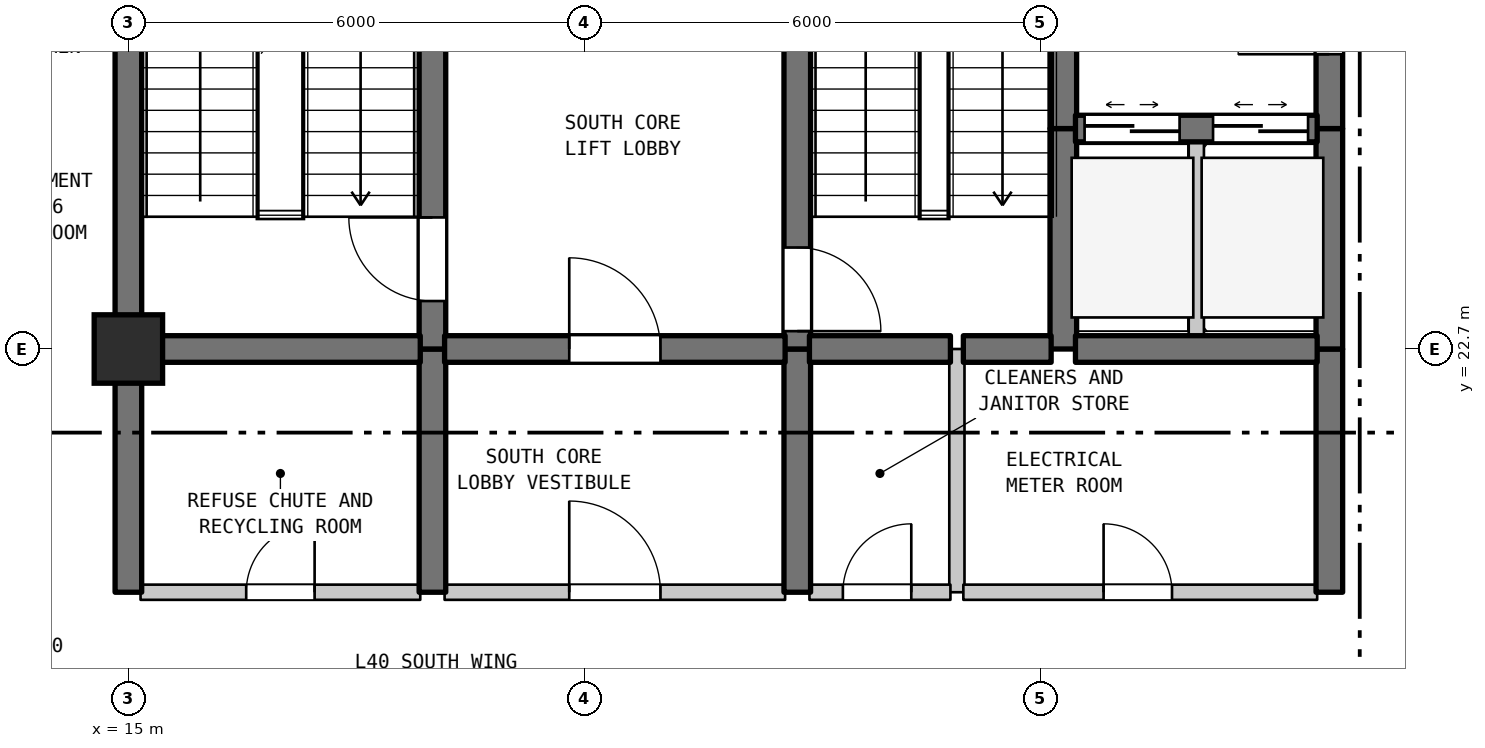
"""IFC4 building model, lengths in metres.
Left out: names, types, materials, properties, quantities, classifications, styles, units other than length and angle.
Written with IfcOpenShell. Run it as: python <this file> out.ifc"""

import sys

from ifc_helpers import new_model, si_unit, direction, frame, frame_2d, origin, origin_2d, place, context, subcontext, project, spatial, rectangle, extrude, element, fill, save


model = new_model("IFC4")
c1 = context("Model", 3, precision=1e-05, world=origin(), true_north=direction((0.0, 1.0)))
c2 = subcontext(c1, "Body", "Model", "MODEL_VIEW")
j1 = project(units=[si_unit("LENGTHUNIT", "METRE"), si_unit("PLANEANGLEUNIT", "RADIAN")], contexts=[c1])
p1 = place(None, origin())
s1 = spatial("IfcSite", under=j1, at=p1, CompositionType="ELEMENT")
p2 = place(p1, origin())
s2 = spatial("IfcBuilding", under=s1, at=p2, CompositionType="ELEMENT")
p3 = place(p2, frame((0.0, 0.0, 164.6)))
s3 = spatial("IfcBuildingStorey", under=s2, at=p3, CompositionType="ELEMENT", Elevation=164.6)
p4 = place(p3, frame((15.0, 22.7, 0.0), z_axis=(0.0, 0.0, 1.0), x_axis=(1.0, 0.0, 0.0)))
e1 = element("IfcColumn", 1, at=p4, inside=s3, PredefinedType="COLUMN", context=c2, shape_type="SweptSolid", body=[
    extrude(rectangle(XDim=0.9, YDim=0.9, at=origin_2d()), origin(), (0.0, 0.0, 1.0), 4.5),
])
p5 = place(p3, frame((15.0, 19.5, 0.0), z_axis=(0.0, 0.0, 1.0), x_axis=(0.0, 1.0, 0.0)))
e2 = element("IfcWall", 2, at=p5, inside=s3, PredefinedType="SHEAR", context=c2, shape_type="SweptSolid", body=[
    extrude(rectangle(XDim=3.2, YDim=0.35, at=frame_2d((1.6, 0.0))), origin(), (0.0, 0.0, 1.0), 4.19),
])
p6 = place(p3, frame((15.0, 22.7, 0.0), z_axis=(0.0, 0.0, 1.0), x_axis=(0.0, 1.0, 0.0)))
e3 = element("IfcWall", 3, at=p6, inside=s3, PredefinedType="SHEAR", context=c2, shape_type="SweptSolid", body=[
    extrude(rectangle(XDim=6.8, YDim=0.35, at=frame_2d((3.4, 0.0))), origin(), (0.0, 0.0, 1.0), 4.19),
])
p7 = place(p3, frame((19.0, 19.5, 0.0), z_axis=(0.0, 0.0, 1.0), x_axis=(0.0, 1.0, 0.0)))
e4 = element("IfcWall", 4, at=p7, inside=s3, PredefinedType="SHEAR", context=c2, shape_type="SweptSolid", body=[
    extrude(rectangle(XDim=3.2, YDim=0.35, at=frame_2d((1.6, 0.0))), origin(), (0.0, 0.0, 1.0), 4.19),
])
p8 = place(p3, frame((19.0, 22.7, 0.0), z_axis=(0.0, 0.0, 1.0), x_axis=(0.0, 1.0, 0.0)))
e5 = element("IfcWall", 5, at=p8, inside=s3, PredefinedType="SHEAR", context=c2, shape_type="SweptSolid", body=[
    extrude(rectangle(XDim=5.5, YDim=0.35, at=frame_2d((2.75, 0.0))), origin(), (0.0, 0.0, 1.0), 4.19),
])
p9 = place(p8, frame((0.631, 0.0, 0.0)))
e6 = element("IfcOpeningElement", 6, at=p9, cuts=e5, PredefinedType="OPENING", context=c2, shape_type="SweptSolid", body=[
    extrude(rectangle(XDim=1.1, YDim=2.15, at=frame_2d((0.55, 1.075))), frame((0.0, 0.185, 0.0), z_axis=(0.0, -1.0, 0.0), x_axis=(1.0, 0.0, 0.0)), (0.0, 0.0, 1.0), 0.37),
])
p10 = place(p3, frame((23.8, 19.5, 0.0), z_axis=(0.0, 0.0, 1.0), x_axis=(0.0, 1.0, 0.0)))
e7 = element("IfcWall", 7, at=p10, inside=s3, PredefinedType="SHEAR", context=c2, shape_type="SweptSolid", body=[
    extrude(rectangle(XDim=3.2, YDim=0.35, at=frame_2d((1.6, 0.0))), origin(), (0.0, 0.0, 1.0), 4.19),
])
p11 = place(p3, frame((23.8, 22.7, 0.0), z_axis=(0.0, 0.0, 1.0), x_axis=(0.0, 1.0, 0.0)))
e8 = element("IfcWall", 8, at=p11, inside=s3, PredefinedType="SHEAR", context=c2, shape_type="SweptSolid", body=[
    extrude(rectangle(XDim=5.5, YDim=0.35, at=frame_2d((2.75, 0.0))), origin(), (0.0, 0.0, 1.0), 4.19),
])
p12 = place(p11, frame((0.235, 0.0, 0.0)))
e9 = element("IfcOpeningElement", 9, at=p12, cuts=e8, PredefinedType="OPENING", context=c2, shape_type="SweptSolid", body=[
    extrude(rectangle(XDim=1.1, YDim=2.15, at=frame_2d((0.55, 1.075))), frame((0.0, 0.185, 0.0), z_axis=(0.0, -1.0, 0.0), x_axis=(1.0, 0.0, 0.0)), (0.0, 0.0, 1.0), 0.37),
])
p13 = place(p3, frame((25.9, 19.5, 0.0), z_axis=(0.0, 0.0, 1.0), x_axis=(0.0, 1.0, 0.0)))
e10 = element("IfcWall", 10, at=p13, inside=s3, PredefinedType="STANDARD", context=c2, shape_type="SweptSolid", body=[
    extrude(rectangle(XDim=3.2, YDim=0.2, at=frame_2d((1.6, 0.0))), origin(), (0.0, 0.0, 1.0), 4.19),
])
p14 = place(p3, frame((27.3, 22.7, 0.0), z_axis=(0.0, 0.0, 1.0), x_axis=(0.0, 1.0, 0.0)))
e11 = element("IfcWall", 11, at=p14, inside=s3, PredefinedType="SHEAR", context=c2, shape_type="SweptSolid", body=[
    extrude(rectangle(XDim=2.9, YDim=0.35, at=frame_2d((1.45, 0.0))), origin(), (0.0, 0.0, 1.0), 4.19),
])
p15 = place(p3, frame((27.3, 25.6, 0.0), z_axis=(0.0, 0.0, 1.0), x_axis=(0.0, 1.0, 0.0)))
e12 = element("IfcWall", 12, at=p15, inside=s3, PredefinedType="SHEAR", context=c2, shape_type="SweptSolid", body=[
    extrude(rectangle(XDim=3.3, YDim=0.35, at=frame_2d((1.65, 0.0))), origin(), (0.0, 0.0, 1.0), 4.19),
])
p16 = place(p3, frame((29.05, 22.7, 0.0), z_axis=(0.0, 0.0, 1.0), x_axis=(0.0, 1.0, 0.0)))
e13 = element("IfcWall", 13, at=p16, inside=s3, PredefinedType="STANDARD", context=c2, shape_type="SweptSolid", body=[
    extrude(rectangle(XDim=2.9, YDim=0.2, at=frame_2d((1.45, 0.0))), origin(), (0.0, 0.0, 1.0), 4.19),
])
p17 = place(p3, frame((30.8, 19.5, 0.0), z_axis=(0.0, 0.0, 1.0), x_axis=(0.0, 1.0, 0.0)))
e14 = element("IfcWall", 14, at=p17, inside=s3, PredefinedType="SHEAR", context=c2, shape_type="SweptSolid", body=[
    extrude(rectangle(XDim=3.2, YDim=0.35, at=frame_2d((1.6, 0.0))), origin(), (0.0, 0.0, 1.0), 4.19),
])
p18 = place(p3, frame((30.8, 22.7, 0.0), z_axis=(0.0, 0.0, 1.0), x_axis=(0.0, 1.0, 0.0)))
e15 = element("IfcWall", 15, at=p18, inside=s3, PredefinedType="SHEAR", context=c2, shape_type="SweptSolid", body=[
    extrude(rectangle(XDim=2.9, YDim=0.35, at=frame_2d((1.45, 0.0))), origin(), (0.0, 0.0, 1.0), 4.19),
])
p19 = place(p3, frame((30.8, 25.6, 0.0), z_axis=(0.0, 0.0, 1.0), x_axis=(0.0, 1.0, 0.0)))
e16 = element("IfcWall", 16, at=p19, inside=s3, PredefinedType="SHEAR", context=c2, shape_type="SweptSolid", body=[
    extrude(rectangle(XDim=3.3, YDim=0.35, at=frame_2d((1.65, 0.0))), origin(), (0.0, 0.0, 1.0), 4.19),
])
p20 = place(p19, frame((0.978, 0.0, 0.0)))
e17 = element("IfcOpeningElement", 17, at=p20, cuts=e16, PredefinedType="OPENING", context=c2, shape_type="SweptSolid", body=[
    extrude(rectangle(XDim=1.2, YDim=2.2, at=frame_2d((0.6, 1.1))), frame((0.0, 0.185, 0.0), z_axis=(0.0, -1.0, 0.0), x_axis=(1.0, 0.0, 0.0)), (0.0, 0.0, 1.0), 0.37),
])
p21 = place(p3, frame((15.16, 19.5, 0.0), z_axis=(0.0, 0.0, 1.0), x_axis=(1.0, 0.0, 0.0)))
e18 = element("IfcWall", 18, at=p21, inside=s3, PredefinedType="STANDARD", context=c2, shape_type="SweptSolid", body=[
    extrude(rectangle(XDim=3.68, YDim=0.2, at=frame_2d((1.84, 0.0))), origin(), (0.0, 0.0, 1.0), 4.19),
])
p22 = place(p21, frame((1.39, 0.0, 0.0)))
e19 = element("IfcOpeningElement", 19, at=p22, cuts=e18, PredefinedType="OPENING", context=c2, shape_type="SweptSolid", body=[
    extrude(rectangle(XDim=0.9, YDim=2.15, at=frame_2d((0.45, 1.075))), frame((0.0, 0.11, 0.0), z_axis=(0.0, -1.0, 0.0), x_axis=(1.0, 0.0, 0.0)), (0.0, 0.0, 1.0), 0.22),
])
p23 = place(p3, frame((19.16, 19.5, 0.0), z_axis=(0.0, 0.0, 1.0), x_axis=(1.0, 0.0, 0.0)))
e20 = element("IfcWall", 20, at=p23, inside=s3, PredefinedType="STANDARD", context=c2, shape_type="SweptSolid", body=[
    extrude(rectangle(XDim=4.48, YDim=0.2, at=frame_2d((2.24, 0.0))), origin(), (0.0, 0.0, 1.0), 4.19),
])
p24 = place(p23, frame((1.64, 0.0, 0.0)))
e21 = element("IfcOpeningElement", 21, at=p24, cuts=e20, PredefinedType="OPENING", context=c2, shape_type="SweptSolid", body=[
    extrude(rectangle(XDim=1.2, YDim=2.2, at=frame_2d((0.6, 1.1))), frame((0.0, 0.11, 0.0), z_axis=(0.0, -1.0, 0.0), x_axis=(1.0, 0.0, 0.0)), (0.0, 0.0, 1.0), 0.22),
])
p25 = place(p3, frame((23.96, 19.5, 0.0), z_axis=(0.0, 0.0, 1.0), x_axis=(1.0, 0.0, 0.0)))
e22 = element("IfcWall", 22, at=p25, inside=s3, PredefinedType="STANDARD", context=c2, shape_type="SweptSolid", body=[
    extrude(rectangle(XDim=1.855, YDim=0.2, at=frame_2d((0.927, 0.0))), origin(), (0.0, 0.0, 1.0), 4.19),
])
p26 = place(p25, frame((0.44, 0.0, 0.0)))
e23 = element("IfcOpeningElement", 23, at=p26, cuts=e22, PredefinedType="OPENING", context=c2, shape_type="SweptSolid", body=[
    extrude(rectangle(XDim=0.9, YDim=2.15, at=frame_2d((0.45, 1.075))), frame((0.0, 0.11, 0.0), z_axis=(0.0, -1.0, 0.0), x_axis=(1.0, 0.0, 0.0)), (0.0, 0.0, 1.0), 0.22),
])
p27 = place(p3, frame((25.985, 19.5, 0.0), z_axis=(0.0, 0.0, 1.0), x_axis=(1.0, 0.0, 0.0)))
e24 = element("IfcWall", 24, at=p27, inside=s3, PredefinedType="STANDARD", context=c2, shape_type="SweptSolid", body=[
    extrude(rectangle(XDim=4.655, YDim=0.2, at=frame_2d((2.327, 0.0))), origin(), (0.0, 0.0, 1.0), 4.19),
])
p28 = place(p27, frame((1.845, 0.0, 0.0)))
e25 = element("IfcOpeningElement", 25, at=p28, cuts=e24, PredefinedType="OPENING", context=c2, shape_type="SweptSolid", body=[
    extrude(rectangle(XDim=0.9, YDim=2.15, at=frame_2d((0.45, 1.075))), frame((0.0, 0.11, 0.0), z_axis=(0.0, -1.0, 0.0), x_axis=(1.0, 0.0, 0.0)), (0.0, 0.0, 1.0), 0.22),
])
p29 = place(p3, frame((15.16, 22.7, 0.0), z_axis=(0.0, 0.0, 1.0), x_axis=(1.0, 0.0, 0.0)))
e26 = element("IfcWall", 26, at=p29, inside=s3, PredefinedType="SHEAR", context=c2, shape_type="SweptSolid", body=[
    extrude(rectangle(XDim=3.68, YDim=0.35, at=frame_2d((1.84, 0.0))), origin(), (0.0, 0.0, 1.0), 4.19),
])
p30 = place(p3, frame((19.16, 22.7, 0.0), z_axis=(0.0, 0.0, 1.0), x_axis=(1.0, 0.0, 0.0)))
e27 = element("IfcWall", 27, at=p30, inside=s3, PredefinedType="SHEAR", context=c2, shape_type="SweptSolid", body=[
    extrude(rectangle(XDim=4.48, YDim=0.35, at=frame_2d((2.24, 0.0))), origin(), (0.0, 0.0, 1.0), 4.19),
])
p31 = place(p30, frame((1.64, 0.0, 0.0)))
e28 = element("IfcOpeningElement", 28, at=p31, cuts=e27, PredefinedType="OPENING", context=c2, shape_type="SweptSolid", body=[
    extrude(rectangle(XDim=1.2, YDim=2.2, at=frame_2d((0.6, 1.1))), frame((0.0, 0.185, 0.0), z_axis=(0.0, -1.0, 0.0), x_axis=(1.0, 0.0, 0.0)), (0.0, 0.0, 1.0), 0.37),
])
p32 = place(p3, frame((23.96, 22.7, 0.0), z_axis=(0.0, 0.0, 1.0), x_axis=(1.0, 0.0, 0.0)))
e29 = element("IfcWall", 29, at=p32, inside=s3, PredefinedType="SHEAR", context=c2, shape_type="SweptSolid", body=[
    extrude(rectangle(XDim=1.855, YDim=0.35, at=frame_2d((0.927, 0.0))), origin(), (0.0, 0.0, 1.0), 4.19),
])
p33 = place(p3, frame((25.985, 22.7, 0.0), z_axis=(0.0, 0.0, 1.0), x_axis=(1.0, 0.0, 0.0)))
e30 = element("IfcWall", 30, at=p33, inside=s3, PredefinedType="SHEAR", context=c2, shape_type="SweptSolid", body=[
    extrude(rectangle(XDim=1.155, YDim=0.35, at=frame_2d((0.577, 0.0))), origin(), (0.0, 0.0, 1.0), 4.19),
])
p34 = place(p3, frame((27.46, 22.7, 0.0), z_axis=(0.0, 0.0, 1.0), x_axis=(1.0, 0.0, 0.0)))
e31 = element("IfcWall", 31, at=p34, inside=s3, PredefinedType="SHEAR", context=c2, shape_type="SweptSolid", body=[
    extrude(rectangle(XDim=3.18, YDim=0.35, at=frame_2d((1.59, 0.0))), origin(), (0.0, 0.0, 1.0), 4.19),
])
p35 = place(p3, frame((27.46, 25.6, 0.0), z_axis=(0.0, 0.0, 1.0), x_axis=(1.0, 0.0, 0.0)))
e32 = element("IfcWall", 32, at=p35, inside=s3, PredefinedType="SHEAR", context=c2, shape_type="SweptSolid", body=[
    extrude(rectangle(XDim=3.18, YDim=0.35, at=frame_2d((1.59, 0.0))), origin(), (0.0, 0.0, 1.0), 4.19),
])
p36 = place(p35, frame((0.12, 0.0, 0.0)))
e33 = element("IfcOpeningElement", 33, at=p36, cuts=e32, PredefinedType="OPENING", context=c2, shape_type="SweptSolid", body=[
    extrude(rectangle(XDim=1.25, YDim=2.2, at=frame_2d((0.625, 1.1))), frame((0.0, 0.185, 0.0), z_axis=(0.0, -1.0, 0.0), x_axis=(1.0, 0.0, 0.0)), (0.0, 0.0, 1.0), 0.37),
])
p37 = place(p35, frame((1.81, 0.0, 0.0)))
e34 = element("IfcOpeningElement", 34, at=p37, cuts=e32, PredefinedType="OPENING", context=c2, shape_type="SweptSolid", body=[
    extrude(rectangle(XDim=1.25, YDim=2.2, at=frame_2d((0.625, 1.1))), frame((0.0, 0.185, 0.0), z_axis=(0.0, -1.0, 0.0), x_axis=(1.0, 0.0, 0.0)), (0.0, 0.0, 1.0), 0.37),
])
p38 = place(p9, origin())
e35 = element("IfcDoor", 35, at=p38, inside=s3, OperationType="SINGLE_SWING_RIGHT", PredefinedType="DOOR", context=c2, shape_type="SweptSolid", body=[
    extrude(rectangle(XDim=1.1, YDim=2.15, at=frame_2d((0.55, 1.075))), frame((0.0, 0.025, 0.0), z_axis=(0.0, -1.0, 0.0), x_axis=(1.0, 0.0, 0.0)), (0.0, 0.0, 1.0), 0.05),
])
fill(e6, e35)
p39 = place(p12, frame((1.1, 0.0, 0.0), z_axis=(0.0, 0.0, 1.0), x_axis=(-1.0, 0.0, 0.0)))
e36 = element("IfcDoor", 36, at=p39, inside=s3, OperationType="SINGLE_SWING_LEFT", PredefinedType="DOOR", context=c2, shape_type="SweptSolid", body=[
    extrude(rectangle(XDim=1.1, YDim=2.15, at=frame_2d((0.55, 1.075))), frame((0.0, 0.025, 0.0), z_axis=(0.0, -1.0, 0.0), x_axis=(1.0, 0.0, 0.0)), (0.0, 0.0, 1.0), 0.05),
])
fill(e9, e36)
p40 = place(p20, origin())
e37 = element("IfcDoor", 37, at=p40, inside=s3, OperationType="SINGLE_SWING_LEFT", PredefinedType="DOOR", context=c2, shape_type="SweptSolid", body=[
    extrude(rectangle(XDim=1.2, YDim=2.2, at=frame_2d((0.6, 1.1))), frame((0.0, 0.025, 0.0), z_axis=(0.0, -1.0, 0.0), x_axis=(1.0, 0.0, 0.0)), (0.0, 0.0, 1.0), 0.05),
])
fill(e17, e37)
p41 = place(p22, origin())
e38 = element("IfcDoor", 38, at=p41, inside=s3, OperationType="SINGLE_SWING_RIGHT", PredefinedType="DOOR", context=c2, shape_type="SweptSolid", body=[
    extrude(rectangle(XDim=0.9, YDim=2.15, at=frame_2d((0.45, 1.075))), frame((0.0, 0.025, 0.0), z_axis=(0.0, -1.0, 0.0), x_axis=(1.0, 0.0, 0.0)), (0.0, 0.0, 1.0), 0.05),
])
fill(e19, e38)
p42 = place(p24, origin())
e39 = element("IfcDoor", 39, at=p42, inside=s3, OperationType="SINGLE_SWING_LEFT", PredefinedType="DOOR", context=c2, shape_type="SweptSolid", body=[
    extrude(rectangle(XDim=1.2, YDim=2.2, at=frame_2d((0.6, 1.1))), frame((0.0, 0.025, 0.0), z_axis=(0.0, -1.0, 0.0), x_axis=(1.0, 0.0, 0.0)), (0.0, 0.0, 1.0), 0.05),
])
fill(e21, e39)
p43 = place(p26, origin())
e40 = element("IfcDoor", 40, at=p43, inside=s3, OperationType="SINGLE_SWING_RIGHT", PredefinedType="DOOR", context=c2, shape_type="SweptSolid", body=[
    extrude(rectangle(XDim=0.9, YDim=2.15, at=frame_2d((0.45, 1.075))), frame((0.0, 0.025, 0.0), z_axis=(0.0, -1.0, 0.0), x_axis=(1.0, 0.0, 0.0)), (0.0, 0.0, 1.0), 0.05),
])
fill(e23, e40)
p44 = place(p28, origin())
e41 = element("IfcDoor", 41, at=p44, inside=s3, OperationType="SINGLE_SWING_LEFT", PredefinedType="DOOR", context=c2, shape_type="SweptSolid", body=[
    extrude(rectangle(XDim=0.9, YDim=2.15, at=frame_2d((0.45, 1.075))), frame((0.0, 0.025, 0.0), z_axis=(0.0, -1.0, 0.0), x_axis=(1.0, 0.0, 0.0)), (0.0, 0.0, 1.0), 0.05),
])
fill(e25, e41)
p45 = place(p31, origin())
e42 = element("IfcDoor", 42, at=p45, inside=s3, OperationType="SINGLE_SWING_LEFT", PredefinedType="DOOR", context=c2, shape_type="SweptSolid", body=[
    extrude(rectangle(XDim=1.2, YDim=2.2, at=frame_2d((0.6, 1.1))), frame((0.0, 0.025, 0.0), z_axis=(0.0, -1.0, 0.0), x_axis=(1.0, 0.0, 0.0)), (0.0, 0.0, 1.0), 0.05),
])
fill(e28, e42)
p46 = place(p36, origin())
e43 = element("IfcDoor", 43, at=p46, inside=s3, OperationType="DOUBLE_DOOR_SLIDING", PredefinedType="DOOR", context=c2, shape_type="SweptSolid", body=[
    extrude(rectangle(XDim=1.25, YDim=2.2, at=frame_2d((0.625, 1.1))), frame((0.0, 0.025, 0.0), z_axis=(0.0, -1.0, 0.0), x_axis=(1.0, 0.0, 0.0)), (0.0, 0.0, 1.0), 0.05),
])
fill(e33, e43)
p47 = place(p37, origin())
e44 = element("IfcDoor", 44, at=p47, inside=s3, OperationType="DOUBLE_DOOR_SLIDING", PredefinedType="DOOR", context=c2, shape_type="SweptSolid", body=[
    extrude(rectangle(XDim=1.25, YDim=2.2, at=frame_2d((0.625, 1.1))), frame((0.0, 0.025, 0.0), z_axis=(0.0, -1.0, 0.0), x_axis=(1.0, 0.0, 0.0)), (0.0, 0.0, 1.0), 0.05),
])
fill(e34, e44)
save(model, sys.argv[1])
